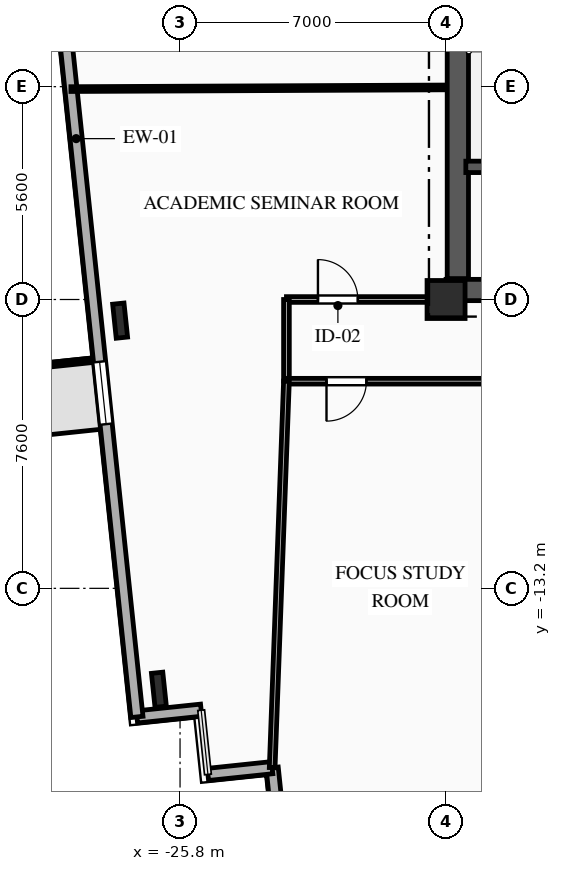
"""IFC4 building model, lengths in metres.
Left out: names, types, materials, properties, quantities, classifications, styles, units other than length and angle.
Written with IfcOpenShell. Run it as: python <this file> out.ifc"""

import sys

from ifc_helpers import new_model, si_unit, direction, frame, frame_2d, origin, origin_2d, place, context, subcontext, project, spatial, rectangle, i_section, extrude, element, fill, save


model = new_model("IFC4")
c1 = context("Model", 3, precision=1e-05, world=origin(), true_north=direction((0.0, 1.0)))
c2 = subcontext(c1, "Body", "Model", "MODEL_VIEW")
j1 = project(units=[si_unit("LENGTHUNIT", "METRE"), si_unit("PLANEANGLEUNIT", "RADIAN")], contexts=[c1])
p1 = place(None, origin())
s1 = spatial("IfcSite", under=j1, at=p1, CompositionType="ELEMENT")
p2 = place(p1, origin())
s2 = spatial("IfcBuilding", under=s1, at=p2, CompositionType="ELEMENT")
p3 = place(p2, frame((0.0, 0.0, 112.5)))
s3 = spatial("IfcBuildingStorey", under=s2, at=p3, CompositionType="ELEMENT", Elevation=112.5)
p4 = place(p3, frame((-18.8, -5.6, 0.0), z_axis=(0.0, 0.0, 1.0), x_axis=(1.0, 0.0, 0.0)))
e1 = element("IfcColumn", 1, at=p4, inside=s3, PredefinedType="COLUMN", context=c2, shape_type="SweptSolid", body=[
    extrude(rectangle(XDim=1.0, YDim=1.0, at=origin_2d()), origin(), (0.0, 0.0, 1.0), 3.35),
])
for number, where, z_axis, x_axis in (
    (2, (-27.377, -6.156, 0.0), (0.0, 0.0, 1.0), (0.995, 0.105, 0.0)),
    (3, (-26.356, -15.869, 0.0), (0.0, 0.0, 1.0), (0.995, 0.105, 0.0)),
):
    element("IfcColumn", number, at=place(p3, frame(where, z_axis=z_axis, x_axis=x_axis)), inside=s3, PredefinedType="COLUMN", context=c2, shape_type="SweptSolid", body=[
        extrude(i_section(OverallWidth=0.3, OverallDepth=0.9, WebThickness=0.019, FlangeThickness=0.035, FilletRadius=0.03, at=origin_2d()), origin(), (0.0, 0.0, 1.0), 3.35),
    ])
for number, where, z_axis, x_axis in (
    (4, (-23.198, -19.609, 0.0), (0.0, 0.0, 1.0), (-0.105, 0.995, 0.0)),
    (5, (-23.376, -17.919, 0.0), (0.0, 0.0, 1.0), (-0.995, -0.105, 0.0)),
):
    element("IfcWall", number, at=place(p3, frame(where, z_axis=z_axis, x_axis=x_axis)), inside=s3, PredefinedType="SOLIDWALL", context=c2, shape_type="SweptSolid", body=[
        extrude(rectangle(XDim=1.7, YDim=0.32, at=frame_2d((0.85, 0.0))), origin(), (0.0, 0.0, 1.0), 3.045),
    ])
p5 = place(p3, frame((-25.244, -16.406, 0.0), z_axis=(0.0, 0.0, 1.0), x_axis=(-0.994521177842, -0.104535289845, 0.0)))
e6 = element("IfcWall", 6, at=p5, inside=s3, PredefinedType="SOLIDWALL", context=c2, shape_type="SweptSolid", body=[
    extrude(rectangle(XDim=1.7, YDim=0.32, at=frame_2d((0.85, 0.0))), origin(), (0.0, 0.0, 1.0), 3.045),
])
p6 = place(p3, frame((-26.935, -16.583, 0.0), z_axis=(0.0, 0.0, 1.0), x_axis=(-0.104524887486, 0.994522271192, 0.0)))
e7 = element("IfcWall", 7, at=p6, inside=s3, PredefinedType="SOLIDWALL", context=c2, shape_type="SweptSolid", body=[
    extrude(rectangle(XDim=30.6, YDim=0.32, at=frame_2d((15.3, 0.0))), origin(), (0.0, 0.0, 1.0), 3.045),
])
p7 = place(p6, frame((7.746, 0.0, 0.85)))
e8 = element("IfcOpeningElement", 8, at=p7, cuts=e7, PredefinedType="OPENING", context=c2, shape_type="SweptSolid", body=[
    extrude(rectangle(XDim=1.65, YDim=1.85, at=frame_2d((0.825, 0.925))), frame((0.0, 0.17, 0.0), z_axis=(0.0, -1.0, 0.0), x_axis=(1.0, 0.0, 0.0)), (0.0, 0.0, 1.0), 0.34),
])
p8 = place(p6, frame((22.631, 0.0, 0.85)))
e9 = element("IfcOpeningElement", 9, at=p8, cuts=e7, PredefinedType="OPENING", context=c2, shape_type="SweptSolid", body=[
    extrude(rectangle(XDim=1.6, YDim=1.85, at=frame_2d((0.8, 0.925))), frame((0.0, 0.17, 0.0), z_axis=(0.0, -1.0, 0.0), x_axis=(1.0, 0.0, 0.0)), (0.0, 0.0, 1.0), 0.34),
])
p9 = place(p3, frame((30.307, -13.986, 0.0), z_axis=(0.0, 0.0, 1.0), x_axis=(-0.994521628355, -0.104531003701, 0.0)))
e10 = element("IfcWall", 10, at=p9, inside=s3, PredefinedType="SOLIDWALL", context=c2, shape_type="SweptSolid", body=[
    extrude(rectangle(XDim=53.8, YDim=0.32, at=frame_2d((26.9, 0.0))), origin(), (0.0, 0.0, 1.0), 3.045),
])
p10 = place(p9, frame((3.098, 0.0, 0.85)))
e11 = element("IfcOpeningElement", 11, at=p10, cuts=e10, PredefinedType="OPENING", context=c2, shape_type="SweptSolid", body=[
    extrude(rectangle(XDim=1.65, YDim=1.85, at=frame_2d((0.825, 0.925))), frame((0.0, 0.17, 0.0), z_axis=(0.0, -1.0, 0.0), x_axis=(1.0, 0.0, 0.0)), (0.0, 0.0, 1.0), 0.34),
])
p11 = place(p9, frame((9.302, 0.0, 0.85)))
e12 = element("IfcOpeningElement", 12, at=p11, cuts=e10, PredefinedType="OPENING", context=c2, shape_type="SweptSolid", body=[
    extrude(rectangle(XDim=1.65, YDim=1.85, at=frame_2d((0.825, 0.925))), frame((0.0, 0.17, 0.0), z_axis=(0.0, -1.0, 0.0), x_axis=(1.0, 0.0, 0.0)), (0.0, 0.0, 1.0), 0.34),
])
p12 = place(p9, frame((14.827, 0.0, 0.85)))
e13 = element("IfcOpeningElement", 13, at=p12, cuts=e10, PredefinedType="OPENING", context=c2, shape_type="SweptSolid", body=[
    extrude(rectangle(XDim=1.65, YDim=1.85, at=frame_2d((0.825, 0.925))), frame((0.0, 0.17, 0.0), z_axis=(0.0, -1.0, 0.0), x_axis=(1.0, 0.0, 0.0)), (0.0, 0.0, 1.0), 0.34),
])
p13 = place(p9, frame((23.078, 0.0, 0.85)))
e14 = element("IfcOpeningElement", 14, at=p13, cuts=e10, PredefinedType="OPENING", context=c2, shape_type="SweptSolid", body=[
    extrude(rectangle(XDim=2.2, YDim=1.85, at=frame_2d((1.1, 0.925))), frame((0.0, 0.17, 0.0), z_axis=(0.0, -1.0, 0.0), x_axis=(1.0, 0.0, 0.0)), (0.0, 0.0, 1.0), 0.34),
])
p14 = place(p9, frame((34.646, 0.0, 0.85)))
e15 = element("IfcOpeningElement", 15, at=p14, cuts=e10, PredefinedType="OPENING", context=c2, shape_type="SweptSolid", body=[
    extrude(rectangle(XDim=2.2, YDim=1.85, at=frame_2d((1.1, 0.925))), frame((0.0, 0.17, 0.0), z_axis=(0.0, -1.0, 0.0), x_axis=(1.0, 0.0, 0.0)), (0.0, 0.0, 1.0), 0.34),
])
p15 = place(p9, frame((43.728, 0.0, 0.85)))
e16 = element("IfcOpeningElement", 16, at=p15, cuts=e10, PredefinedType="OPENING", context=c2, shape_type="SweptSolid", body=[
    extrude(rectangle(XDim=1.65, YDim=1.85, at=frame_2d((0.825, 0.925))), frame((0.0, 0.17, 0.0), z_axis=(0.0, -1.0, 0.0), x_axis=(1.0, 0.0, 0.0)), (0.0, 0.0, 1.0), 0.34),
])
p16 = place(p9, frame((49.653, 0.0, 0.85)))
e17 = element("IfcOpeningElement", 17, at=p16, cuts=e10, PredefinedType="OPENING", context=c2, shape_type="SweptSolid", body=[
    extrude(rectangle(XDim=1.65, YDim=1.85, at=frame_2d((0.825, 0.925))), frame((0.0, 0.17, 0.0), z_axis=(0.0, -1.0, 0.0), x_axis=(1.0, 0.0, 0.0)), (0.0, 0.0, 1.0), 0.34),
])
p17 = place(p3, frame((-18.8, -5.35, 0.0), z_axis=(0.0, 0.0, 1.0), x_axis=(1.0, 0.0, 0.0)))
e18 = element("IfcWall", 18, at=p17, inside=s3, PredefinedType="SHEAR", context=c2, shape_type="SweptSolid", body=[
    extrude(rectangle(XDim=9.6, YDim=0.56, at=frame_2d((4.8, 0.0))), origin(), (0.0, 0.0, 1.0), 3.045),
])
p18 = place(p17, frame((1.05, 0.0, 0.0)))
e19 = element("IfcOpeningElement", 19, at=p18, cuts=e18, PredefinedType="OPENING", context=c2, shape_type="SweptSolid", body=[
    extrude(rectangle(XDim=0.9, YDim=2.1, at=frame_2d((0.45, 1.05))), frame((0.0, 0.29, 0.0), z_axis=(0.0, -1.0, 0.0), x_axis=(1.0, 0.0, 0.0)), (0.0, 0.0, 1.0), 0.58),
])
p19 = place(p3, frame((-18.49, -5.05, 0.0), z_axis=(0.0, 0.0, 1.0), x_axis=(0.0, 1.0, 0.0)))
e20 = element("IfcWall", 20, at=p19, inside=s3, PredefinedType="SHEAR", context=c2, shape_type="SweptSolid", body=[
    extrude(rectangle(XDim=10.1, YDim=0.56, at=frame_2d((5.05, 0.0))), origin(), (0.0, 0.0, 1.0), 3.045),
])
p20 = place(p3, frame((-18.28, -2.11, 0.0), z_axis=(0.0, 0.0, 1.0), x_axis=(1.0, 0.0, 0.0)))
e21 = element("IfcWall", 21, at=p20, inside=s3, PredefinedType="SHEAR", context=c2, shape_type="SweptSolid", body=[
    extrude(rectangle(XDim=3.18, YDim=0.3, at=frame_2d((1.59, 0.0))), origin(), (0.0, 0.0, 1.0), 3.045),
])
p21 = place(p3, frame((-23.0, -5.6, 0.0), z_axis=(0.0, 0.0, 1.0), x_axis=(1.0, 0.0, 0.0)))
e22 = element("IfcWall", 22, at=p21, inside=s3, PredefinedType="PARTITIONING", context=c2, shape_type="SweptSolid", body=[
    extrude(rectangle(XDim=4.2, YDim=0.15, at=frame_2d((2.1, 0.0))), origin(), (0.0, 0.0, 1.0), 3.045),
])
p22 = place(p21, frame((0.829, 0.0, 0.0)))
e23 = element("IfcOpeningElement", 23, at=p22, cuts=e22, PredefinedType="OPENING", context=c2, shape_type="SweptSolid", body=[
    extrude(rectangle(XDim=1.05, YDim=2.15, at=frame_2d((0.525, 1.075))), frame((0.0, 0.085, 0.0), z_axis=(0.0, -1.0, 0.0), x_axis=(1.0, 0.0, 0.0)), (0.0, 0.0, 1.0), 0.17),
])
p23 = place(p3, frame((-23.0, -7.75, 0.0), z_axis=(0.0, 0.0, 1.0), x_axis=(0.0, 1.0, 0.0)))
e24 = element("IfcWall", 24, at=p23, inside=s3, PredefinedType="PARTITIONING", context=c2, shape_type="SweptSolid", body=[
    extrude(rectangle(XDim=2.15, YDim=0.15, at=frame_2d((1.075, 0.0))), origin(), (0.0, 0.0, 1.0), 2.7),
])
p24 = place(p3, frame((-17.0, -7.75, 0.0), z_axis=(0.0, 0.0, 1.0), x_axis=(-1.0, 0.0, 0.0)))
e25 = element("IfcWall", 25, at=p24, inside=s3, PredefinedType="PARTITIONING", context=c2, shape_type="SweptSolid", body=[
    extrude(rectangle(XDim=6.0, YDim=0.15, at=frame_2d((3.0, 0.0))), origin(), (0.0, 0.0, 1.0), 3.045),
])
p25 = place(p24, frame((3.896, 0.0, 0.0)))
e26 = element("IfcOpeningElement", 26, at=p25, cuts=e25, PredefinedType="OPENING", context=c2, shape_type="SweptSolid", body=[
    extrude(rectangle(XDim=1.05, YDim=2.15, at=frame_2d((0.525, 1.075))), frame((0.0, 0.085, 0.0), z_axis=(0.0, -1.0, 0.0), x_axis=(1.0, 0.0, 0.0)), (0.0, 0.0, 1.0), 0.17),
])
p26 = place(p3, frame((-28.671, -0.064, 0.0), z_axis=(0.0, 0.0, 1.0), x_axis=(0.999990089865, 0.004451985263, 0.0)))
e27 = element("IfcWall", 27, at=p26, inside=s3, PredefinedType="PARTITIONING", context=c2, shape_type="SweptSolid", body=[
    extrude(rectangle(XDim=9.871, YDim=0.125, at=frame_2d((4.936, 0.0))), origin(), (0.0, 0.0, 1.0), 3.045),
])
p27 = place(p3, frame((-23.0, -7.75, 0.0), z_axis=(0.0, 0.0, 1.0), x_axis=(-0.036924695214, -0.999318050914, 0.0)))
e28 = element("IfcWall", 28, at=p27, inside=s3, PredefinedType="PARTITIONING", context=c2, shape_type="SweptSolid", body=[
    extrude(rectangle(XDim=10.176, YDim=0.15, at=frame_2d((5.088, 0.0))), origin(), (0.0, 0.0, 1.0), 3.045),
])
p28 = place(p7, origin())
e29 = element("IfcWindow", 29, at=p28, inside=s3, PartitioningType="SINGLE_PANEL", PredefinedType="WINDOW", context=c2, shape_type="SweptSolid", body=[
    extrude(rectangle(XDim=1.65, YDim=1.85, at=frame_2d((0.825, 0.925))), frame((0.0, 0.03, 0.0), z_axis=(0.0, -1.0, 0.0), x_axis=(1.0, 0.0, 0.0)), (0.0, 0.0, 1.0), 0.06),
])
fill(e8, e29)
p29 = place(p22, origin())
e30 = element("IfcDoor", 30, at=p29, inside=s3, OperationType="SINGLE_SWING_LEFT", PredefinedType="DOOR", context=c2, shape_type="SweptSolid", body=[
    extrude(rectangle(XDim=1.05, YDim=2.15, at=frame_2d((0.525, 1.075))), frame((0.0, 0.025, 0.0), z_axis=(0.0, -1.0, 0.0), x_axis=(1.0, 0.0, 0.0)), (0.0, 0.0, 1.0), 0.05),
])
fill(e23, e30)
p30 = place(p25, origin())
e31 = element("IfcDoor", 31, at=p30, inside=s3, OperationType="SINGLE_SWING_RIGHT", PredefinedType="DOOR", context=c2, shape_type="SweptSolid", body=[
    extrude(rectangle(XDim=1.05, YDim=2.15, at=frame_2d((0.525, 1.075))), frame((0.0, 0.025, 0.0), z_axis=(0.0, -1.0, 0.0), x_axis=(1.0, 0.0, 0.0)), (0.0, 0.0, 1.0), 0.05),
])
fill(e26, e31)
save(model, sys.argv[1])
